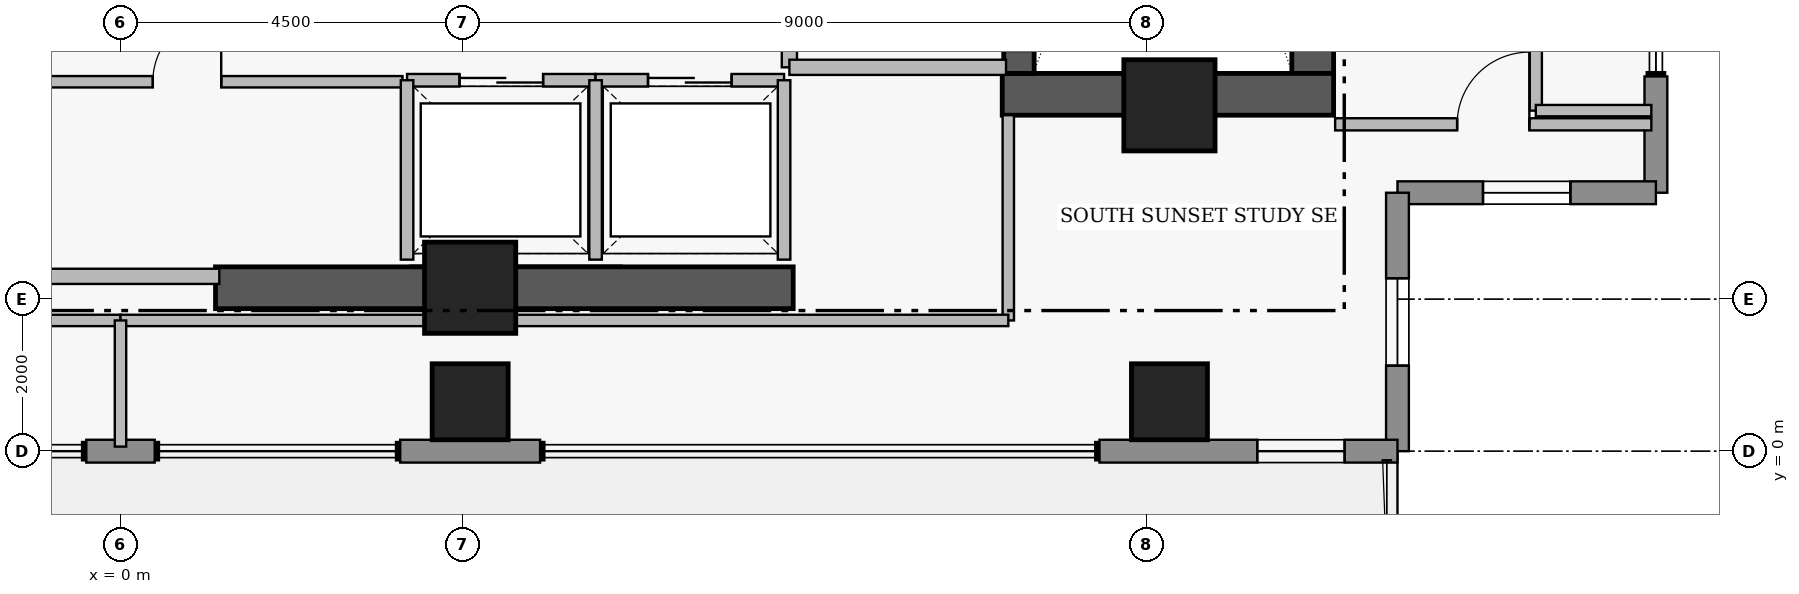
"""IFC4 building model, lengths in metres.
Left out: names, types, materials, properties, quantities, classifications, styles, units other than length and angle.
Written with IfcOpenShell. Run it as: python <this file> out.ifc"""

import sys

from ifc_helpers import new_model, si_unit, direction, frame, frame_2d, origin, origin_2d, place, context, subcontext, project, spatial, rectangle, extrude, element, fill, save


model = new_model("IFC4")
c1 = context("Model", 3, precision=1e-05, world=origin(), true_north=direction((0.0, 1.0)))
c2 = subcontext(c1, "Body", "Model", "MODEL_VIEW")
j1 = project(units=[si_unit("LENGTHUNIT", "METRE"), si_unit("PLANEANGLEUNIT", "RADIAN")], contexts=[c1])
p1 = place(None, origin())
s1 = spatial("IfcSite", under=j1, at=p1, CompositionType="ELEMENT")
p2 = place(p1, origin())
s2 = spatial("IfcBuilding", under=s1, at=p2, CompositionType="ELEMENT")
p3 = place(p2, frame((0.0, 0.0, 292.85)))
s3 = spatial("IfcBuildingStorey", under=s2, at=p3, CompositionType="ELEMENT", Elevation=292.85)
p4 = place(p3, frame((15.685, 4.97, 0.0), z_axis=(0.0, 0.0, 1.0), x_axis=(0.0, 1.0, 0.0)))
e1 = element("IfcWall", 1, at=p4, inside=s3, PredefinedType="SHEAR", context=c2, shape_type="SweptSolid", body=[
    extrude(rectangle(XDim=8.96, YDim=0.55, at=frame_2d((4.48, 0.0))), origin(), (0.0, 0.0, 1.0), 4.21),
])
p5 = place(p3, frame((11.6, 4.695, 0.0), z_axis=(0.0, 0.0, 1.0), x_axis=(1.0, 0.0, 0.0)))
e2 = element("IfcWall", 2, at=p5, inside=s3, PredefinedType="SHEAR", context=c2, shape_type="SweptSolid", body=[
    extrude(rectangle(XDim=4.36, YDim=0.55, at=frame_2d((2.18, 0.0))), origin(), (0.0, 0.0, 1.0), 4.21),
])
p6 = place(p3, frame((1.25, 2.15, 0.0), z_axis=(0.0, 0.0, 1.0), x_axis=(1.0, 0.0, 0.0)))
e3 = element("IfcWall", 3, at=p6, inside=s3, PredefinedType="SHEAR", context=c2, shape_type="SweptSolid", body=[
    extrude(rectangle(XDim=7.6, YDim=0.55, at=frame_2d((3.8, 0.0))), origin(), (0.0, 0.0, 1.0), 4.16),
])
p7 = place(p3, frame((11.82, 13.93, 0.0), z_axis=(0.0, 0.0, 1.0), x_axis=(0.0, -1.0, 0.0)))
e4 = element("IfcWall", 4, at=p7, inside=s3, PredefinedType="SHEAR", context=c2, shape_type="SweptSolid", body=[
    extrude(rectangle(XDim=8.96, YDim=0.4, at=frame_2d((4.48, 0.0))), origin(), (0.0, 0.0, 1.0), 4.21),
])
p8 = place(p7, frame((7.53, 0.0, 0.0)))
e5 = element("IfcOpeningElement", 5, at=p8, cuts=e4, PredefinedType="OPENING", context=c2, shape_type="SweptSolid", body=[
    extrude(rectangle(XDim=1.12, YDim=2.22, at=frame_2d((0.56, 1.11))), frame((0.0, 0.21, 0.0), z_axis=(0.0, -1.0, 0.0), x_axis=(1.0, 0.0, 0.0)), (0.0, 0.0, 1.0), 0.42),
])
for number, where, z_axis, x_axis in (
    (6, (4.6, 2.15, 0.0), (0.0, 0.0, 1.0), (1.0, 0.0, 0.0)),
    (7, (13.8, 4.55, 0.0), (0.0, 0.0, 1.0), (1.0, 0.0, 0.0)),
):
    element("IfcColumn", number, at=place(p3, frame(where, z_axis=z_axis, x_axis=x_axis)), inside=s3, PredefinedType="COLUMN", context=c2, shape_type="SweptSolid", body=[
        extrude(rectangle(XDim=1.2, YDim=1.2, at=origin_2d()), origin(), (0.0, 0.0, 1.0), 4.4),
    ])
for number, where, z_axis, x_axis in (
    (8, (4.6, 0.65, 0.0), (0.0, 0.0, 1.0), (1.0, 0.0, 0.0)),
    (9, (13.8, 0.65, 0.0), (0.0, 0.0, 1.0), (1.0, 0.0, 0.0)),
):
    element("IfcColumn", number, at=place(p3, frame(where, z_axis=z_axis, x_axis=x_axis)), inside=s3, PredefinedType="COLUMN", context=c2, shape_type="SweptSolid", body=[
        extrude(rectangle(XDim=1.0, YDim=1.0, at=origin_2d()), origin(), (0.0, 0.0, 1.0), 4.4),
    ])
p9 = place(p3, frame((20.2, 4.93, 0.0), z_axis=(0.0, 0.0, 1.0), x_axis=(0.0, -1.0, 0.0)))
e10 = element("IfcWall", 10, at=p9, inside=s3, PredefinedType="STANDARD", context=c2, shape_type="SweptSolid", body=[
    extrude(rectangle(XDim=1.53, YDim=0.3, at=frame_2d((0.765, 0.0))), origin(), (0.0, 0.0, 1.0), 4.16),
])
p10 = place(p3, frame((20.2, 3.4, 0.0), z_axis=(0.0, 0.0, 1.0), x_axis=(-1.0, 0.0, 0.0)))
e11 = element("IfcWall", 11, at=p10, inside=s3, PredefinedType="STANDARD", context=c2, shape_type="SweptSolid", body=[
    extrude(rectangle(XDim=3.4, YDim=0.3, at=frame_2d((1.7, 0.0))), origin(), (0.0, 0.0, 1.0), 4.16),
])
p11 = place(p10, frame((1.125, 0.0, 1.25)))
e12 = element("IfcOpeningElement", 12, at=p11, cuts=e11, PredefinedType="OPENING", context=c2, shape_type="SweptSolid", body=[
    extrude(rectangle(XDim=1.15, YDim=1.55, at=frame_2d((0.575, 0.775))), frame((0.0, 0.16, 0.0), z_axis=(0.0, -1.0, 0.0), x_axis=(1.0, 0.0, 0.0)), (0.0, 0.0, 1.0), 0.32),
])
p12 = place(p3, frame((16.8, 3.4, 0.0), z_axis=(0.0, 0.0, 1.0), x_axis=(0.0, -1.0, 0.0)))
e13 = element("IfcWall", 13, at=p12, inside=s3, PredefinedType="STANDARD", context=c2, shape_type="SweptSolid", body=[
    extrude(rectangle(XDim=3.4, YDim=0.3, at=frame_2d((1.7, 0.0))), origin(), (0.0, 0.0, 1.0), 4.16),
])
p13 = place(p12, frame((1.125, 0.0, 1.25)))
e14 = element("IfcOpeningElement", 14, at=p13, cuts=e13, PredefinedType="OPENING", context=c2, shape_type="SweptSolid", body=[
    extrude(rectangle(XDim=1.15, YDim=1.55, at=frame_2d((0.575, 0.775))), frame((0.0, 0.16, 0.0), z_axis=(0.0, -1.0, 0.0), x_axis=(1.0, 0.0, 0.0)), (0.0, 0.0, 1.0), 0.32),
])
p14 = place(p3, frame((16.8, 0.0, 0.0), z_axis=(0.0, 0.0, 1.0), x_axis=(-1.0, 0.0, 0.0)))
e15 = element("IfcWall", 15, at=p14, inside=s3, PredefinedType="STANDARD", context=c2, shape_type="SweptSolid", body=[
    extrude(rectangle(XDim=3.92, YDim=0.3, at=frame_2d((1.96, 0.0))), origin(), (0.0, 0.0, 1.0), 4.16),
])
p15 = place(p14, frame((0.695, 0.0, 0.95)))
e16 = element("IfcOpeningElement", 16, at=p15, cuts=e15, PredefinedType="OPENING", context=c2, shape_type="SweptSolid", body=[
    extrude(rectangle(XDim=1.15, YDim=1.55, at=frame_2d((0.575, 0.775))), frame((0.0, 0.16, 0.0), z_axis=(0.0, -1.0, 0.0), x_axis=(1.0, 0.0, 0.0)), (0.0, 0.0, 1.0), 0.32),
])
p16 = place(p3, frame((5.52, 0.0, 0.0), z_axis=(0.0, 0.0, 1.0), x_axis=(-1.0, 0.0, 0.0)))
e17 = element("IfcWall", 17, at=p16, inside=s3, PredefinedType="STANDARD", context=c2, shape_type="SweptSolid", body=[
    extrude(rectangle(XDim=1.84, YDim=0.3, at=frame_2d((0.92, 0.0))), origin(), (0.0, 0.0, 1.0), 4.16),
])
p17 = place(p3, frame((0.45, 0.0, 0.0), z_axis=(0.0, 0.0, 1.0), x_axis=(-1.0, 0.0, 0.0)))
e18 = element("IfcWall", 18, at=p17, inside=s3, PredefinedType="STANDARD", context=c2, shape_type="SweptSolid", body=[
    extrude(rectangle(XDim=0.9, YDim=0.3, at=frame_2d((0.45, 0.0))), origin(), (0.0, 0.0, 1.0), 4.16),
])
p18 = place(p3, frame((8.8, 11.15, 0.0), z_axis=(0.0, 0.0, 1.0), x_axis=(0.0, -1.0, 0.0)))
e19 = element("IfcWall", 19, at=p18, inside=s3, PredefinedType="PARTITIONING", context=c2, shape_type="SweptSolid", body=[
    extrude(rectangle(XDim=6.1, YDim=0.2, at=frame_2d((3.05, 0.0))), origin(), (0.0, 0.0, 1.0), 4.16),
])
p19 = place(p18, frame((1.15, 0.0, 0.0)))
e20 = element("IfcOpeningElement", 20, at=p19, cuts=e19, PredefinedType="OPENING", context=c2, shape_type="SweptSolid", body=[
    extrude(rectangle(XDim=1.1, YDim=2.2, at=frame_2d((0.55, 1.1))), frame((0.0, 0.11, 0.0), z_axis=(0.0, -1.0, 0.0), x_axis=(1.0, 0.0, 0.0)), (0.0, 0.0, 1.0), 0.22),
])
p20 = place(p18, frame((4.75, 0.0, 0.0)))
e21 = element("IfcOpeningElement", 21, at=p20, cuts=e19, PredefinedType="OPENING", context=c2, shape_type="SweptSolid", body=[
    extrude(rectangle(XDim=1.1, YDim=2.2, at=frame_2d((0.55, 1.1))), frame((0.0, 0.11, 0.0), z_axis=(0.0, -1.0, 0.0), x_axis=(1.0, 0.0, 0.0)), (0.0, 0.0, 1.0), 0.22),
])
p21 = place(p3, frame((3.77, 4.88, 0.0), z_axis=(0.0, 0.0, 1.0), x_axis=(1.0, 0.0, 0.0)))
e22 = element("IfcWall", 22, at=p21, inside=s3, PredefinedType="PARTITIONING", context=c2, shape_type="SweptSolid", body=[
    extrude(rectangle(XDim=2.48, YDim=0.165, at=frame_2d((1.24, 0.0))), origin(), (0.0, 0.0, 1.0), 4.16),
])
p22 = place(p21, frame((0.69, 0.0, 0.0)))
e23 = element("IfcOpeningElement", 23, at=p22, cuts=e22, PredefinedType="OPENING", context=c2, shape_type="SweptSolid", body=[
    extrude(rectangle(XDim=1.1, YDim=2.25, at=frame_2d((0.55, 1.125))), frame((0.0, 0.093, 0.0), z_axis=(0.0, -1.0, 0.0), x_axis=(1.0, 0.0, 0.0)), (0.0, 0.0, 1.0), 0.185),
])
p23 = place(p3, frame((6.25, 4.88, 0.0), z_axis=(0.0, 0.0, 1.0), x_axis=(1.0, 0.0, 0.0)))
e24 = element("IfcWall", 24, at=p23, inside=s3, PredefinedType="PARTITIONING", context=c2, shape_type="SweptSolid", body=[
    extrude(rectangle(XDim=2.48, YDim=0.165, at=frame_2d((1.24, 0.0))), origin(), (0.0, 0.0, 1.0), 4.16),
])
p24 = place(p23, frame((0.69, 0.0, 0.0)))
e25 = element("IfcOpeningElement", 25, at=p24, cuts=e24, PredefinedType="OPENING", context=c2, shape_type="SweptSolid", body=[
    extrude(rectangle(XDim=1.1, YDim=2.25, at=frame_2d((0.55, 1.125))), frame((0.0, 0.093, 0.0), z_axis=(0.0, -1.0, 0.0), x_axis=(1.0, 0.0, 0.0)), (0.0, 0.0, 1.0), 0.185),
])
p25 = place(p3, frame((-1.96, 4.86, 0.0), z_axis=(0.0, 0.0, 1.0), x_axis=(1.0, 0.0, 0.0)))
e26 = element("IfcWall", 26, at=p25, inside=s3, PredefinedType="PARTITIONING", context=c2, shape_type="SweptSolid", body=[
    extrude(rectangle(XDim=5.67, YDim=0.15, at=frame_2d((2.835, 0.0))), origin(), (0.0, 0.0, 1.0), 4.16),
])
p26 = place(p25, frame((2.385, 0.0, 0.0)))
e27 = element("IfcOpeningElement", 27, at=p26, cuts=e26, PredefinedType="OPENING", context=c2, shape_type="SweptSolid", body=[
    extrude(rectangle(XDim=0.9, YDim=2.15, at=frame_2d((0.45, 1.075))), frame((0.0, 0.085, 0.0), z_axis=(0.0, -1.0, 0.0), x_axis=(1.0, 0.0, 0.0)), (0.0, 0.0, 1.0), 0.17),
])
p27 = place(p3, frame((15.98, 4.3, 0.0), z_axis=(0.0, 0.0, 1.0), x_axis=(1.0, 0.0, 0.0)))
e28 = element("IfcWall", 28, at=p27, inside=s3, PredefinedType="PARTITIONING", context=c2, shape_type="SweptSolid", body=[
    extrude(rectangle(XDim=4.16, YDim=0.16, at=frame_2d((2.08, 0.0))), origin(), (0.0, 0.0, 1.0), 4.16),
])
p28 = place(p27, frame((1.605, 0.0, 0.0)))
e29 = element("IfcOpeningElement", 29, at=p28, cuts=e28, PredefinedType="OPENING", context=c2, shape_type="SweptSolid", body=[
    extrude(rectangle(XDim=0.95, YDim=2.15, at=frame_2d((0.475, 1.075))), frame((0.0, 0.09, 0.0), z_axis=(0.0, -1.0, 0.0), x_axis=(1.0, 0.0, 0.0)), (0.0, 0.0, 1.0), 0.18),
])
p29 = place(p3, frame((18.62, 4.48, 0.0), z_axis=(0.0, 0.0, 1.0), x_axis=(0.0, 1.0, 0.0)))
e30 = element("IfcWall", 30, at=p29, inside=s3, PredefinedType="PARTITIONING", context=c2, shape_type="SweptSolid", body=[
    extrude(rectangle(XDim=12.17, YDim=0.16, at=frame_2d((6.085, 0.0))), origin(), (0.0, 0.0, 1.0), 4.16),
])
p30 = place(p29, frame((5.625, 0.0, 0.0)))
e31 = element("IfcOpeningElement", 31, at=p30, cuts=e30, PredefinedType="OPENING", context=c2, shape_type="SweptSolid", body=[
    extrude(rectangle(XDim=0.92, YDim=2.12, at=frame_2d((0.46, 1.06))), frame((0.0, 0.09, 0.0), z_axis=(0.0, -1.0, 0.0), x_axis=(1.0, 0.0, 0.0)), (0.0, 0.0, 1.0), 0.18),
])
p31 = place(p3, frame((8.8, 5.05, 0.0), z_axis=(0.0, 0.0, 1.0), x_axis=(1.0, 0.0, 0.0)))
e32 = element("IfcWall", 32, at=p31, inside=s3, PredefinedType="PARTITIONING", context=c2, shape_type="SweptSolid", body=[
    extrude(rectangle(XDim=2.85, YDim=0.2, at=frame_2d((1.425, 0.0))), origin(), (0.0, 0.0, 1.0), 4.16),
])
for number, where, z_axis, x_axis in (
    (33, (3.77, 2.52, 0.0), (0.0, 0.0, 1.0), (0.0, 1.0, 0.0)),
    (34, (6.25, 2.52, 0.0), (0.0, 0.0, 1.0), (0.0, 1.0, 0.0)),
    (35, (8.73, 2.52, 0.0), (0.0, 0.0, 1.0), (0.0, 1.0, 0.0)),
):
    element("IfcWall", number, at=place(p3, frame(where, z_axis=z_axis, x_axis=x_axis)), inside=s3, PredefinedType="PARTITIONING", context=c2, shape_type="SweptSolid", body=[
        extrude(rectangle(XDim=2.36, YDim=0.165, at=frame_2d((1.18, 0.0))), origin(), (0.0, 0.0, 1.0), 4.16),
    ])
p32 = place(p3, frame((-1.3, 2.3, 0.0), z_axis=(0.0, 0.0, 1.0), x_axis=(1.0, 0.0, 0.0)))
e36 = element("IfcWall", 36, at=p32, inside=s3, PredefinedType="PARTITIONING", context=c2, shape_type="SweptSolid", body=[
    extrude(rectangle(XDim=2.6, YDim=0.2, at=frame_2d((1.3, 0.0))), origin(), (0.0, 0.0, 1.0), 3.06),
])
p33 = place(p3, frame((-11.68, 1.72, 0.0), z_axis=(0.0, 0.0, 1.0), x_axis=(1.0, 0.0, 0.0)))
e37 = element("IfcWall", 37, at=p33, inside=s3, PredefinedType="PARTITIONING", context=c2, shape_type="SweptSolid", body=[
    extrude(rectangle(XDim=11.68, YDim=0.15, at=frame_2d((5.84, 0.0))), origin(), (0.0, 0.0, 1.0), 3.06),
])
p34 = place(p3, frame((11.68, 1.72, 0.0), z_axis=(0.0, 0.0, 1.0), x_axis=(0.0, 1.0, 0.0)))
e38 = element("IfcWall", 38, at=p34, inside=s3, PredefinedType="PARTITIONING", context=c2, shape_type="SweptSolid", body=[
    extrude(rectangle(XDim=2.7, YDim=0.15, at=frame_2d((1.35, 0.0))), origin(), (0.0, 0.0, 1.0), 4.16),
])
p35 = place(p3, frame((0.0, 1.72, 0.0), z_axis=(0.0, 0.0, 1.0), x_axis=(1.0, 0.0, 0.0)))
e39 = element("IfcWall", 39, at=p35, inside=s3, PredefinedType="PARTITIONING", context=c2, shape_type="SweptSolid", body=[
    extrude(rectangle(XDim=11.68, YDim=0.15, at=frame_2d((5.84, 0.0))), origin(), (0.0, 0.0, 1.0), 3.06),
])
p36 = place(p3, frame((0.0, 0.06, 0.0), z_axis=(0.0, 0.0, 1.0), x_axis=(0.0, 1.0, 0.0)))
e40 = element("IfcWall", 40, at=p36, inside=s3, PredefinedType="PARTITIONING", context=c2, shape_type="SweptSolid", body=[
    extrude(rectangle(XDim=1.66, YDim=0.15, at=frame_2d((0.83, 0.0))), origin(), (0.0, 0.0, 1.0), 4.16),
])
p37 = place(p3, frame((18.62, 4.48, 0.0), z_axis=(0.0, 0.0, 1.0), x_axis=(1.0, 0.0, 0.0)))
e41 = element("IfcWall", 41, at=p37, inside=s3, PredefinedType="PARTITIONING", context=c2, shape_type="SweptSolid", body=[
    extrude(rectangle(XDim=1.52, YDim=0.15, at=frame_2d((0.76, 0.0))), origin(), (0.0, 0.0, 1.0), 4.16),
])
p38 = place(p11, origin())
e42 = element("IfcWindow", 42, at=p38, inside=s3, PartitioningType="SINGLE_PANEL", PredefinedType="WINDOW", context=c2, shape_type="SweptSolid", body=[
    extrude(rectangle(XDim=1.15, YDim=1.55, at=frame_2d((0.575, 0.775))), frame((0.0, 0.03, 0.0), z_axis=(0.0, -1.0, 0.0), x_axis=(1.0, 0.0, 0.0)), (0.0, 0.0, 1.0), 0.06),
])
fill(e12, e42)
p39 = place(p13, origin())
e43 = element("IfcWindow", 43, at=p39, inside=s3, PartitioningType="SINGLE_PANEL", PredefinedType="WINDOW", context=c2, shape_type="SweptSolid", body=[
    extrude(rectangle(XDim=1.15, YDim=1.55, at=frame_2d((0.575, 0.775))), frame((0.0, 0.03, 0.0), z_axis=(0.0, -1.0, 0.0), x_axis=(1.0, 0.0, 0.0)), (0.0, 0.0, 1.0), 0.06),
])
fill(e14, e43)
p40 = place(p15, origin())
e44 = element("IfcWindow", 44, at=p40, inside=s3, PartitioningType="SINGLE_PANEL", PredefinedType="WINDOW", context=c2, shape_type="SweptSolid", body=[
    extrude(rectangle(XDim=1.15, YDim=1.55, at=frame_2d((0.575, 0.775))), frame((0.0, 0.03, 0.0), z_axis=(0.0, -1.0, 0.0), x_axis=(1.0, 0.0, 0.0)), (0.0, 0.0, 1.0), 0.06),
])
fill(e16, e44)
p41 = place(p22, origin())
e45 = element("IfcDoor", 45, at=p41, inside=s3, OperationType="SLIDING_TO_LEFT", PredefinedType="DOOR", context=c2, shape_type="SweptSolid", body=[
    extrude(rectangle(XDim=1.1, YDim=2.25, at=frame_2d((0.55, 1.125))), frame((0.0, 0.025, 0.0), z_axis=(0.0, -1.0, 0.0), x_axis=(1.0, 0.0, 0.0)), (0.0, 0.0, 1.0), 0.05),
])
fill(e23, e45)
p42 = place(p24, origin())
e46 = element("IfcDoor", 46, at=p42, inside=s3, OperationType="SLIDING_TO_LEFT", PredefinedType="DOOR", context=c2, shape_type="SweptSolid", body=[
    extrude(rectangle(XDim=1.1, YDim=2.25, at=frame_2d((0.55, 1.125))), frame((0.0, 0.025, 0.0), z_axis=(0.0, -1.0, 0.0), x_axis=(1.0, 0.0, 0.0)), (0.0, 0.0, 1.0), 0.05),
])
fill(e25, e46)
p43 = place(p26, origin())
e47 = element("IfcDoor", 47, at=p43, inside=s3, OperationType="SINGLE_SWING_RIGHT", PredefinedType="DOOR", context=c2, shape_type="SweptSolid", body=[
    extrude(rectangle(XDim=0.9, YDim=2.15, at=frame_2d((0.45, 1.075))), frame((0.0, 0.025, 0.0), z_axis=(0.0, -1.0, 0.0), x_axis=(1.0, 0.0, 0.0)), (0.0, 0.0, 1.0), 0.05),
])
fill(e27, e47)
p44 = place(p28, origin())
e48 = element("IfcDoor", 48, at=p44, inside=s3, OperationType="SINGLE_SWING_RIGHT", PredefinedType="DOOR", context=c2, shape_type="SweptSolid", body=[
    extrude(rectangle(XDim=0.95, YDim=2.15, at=frame_2d((0.475, 1.075))), frame((0.0, 0.025, 0.0), z_axis=(0.0, -1.0, 0.0), x_axis=(1.0, 0.0, 0.0)), (0.0, 0.0, 1.0), 0.05),
])
fill(e29, e48)
save(model, sys.argv[1])
